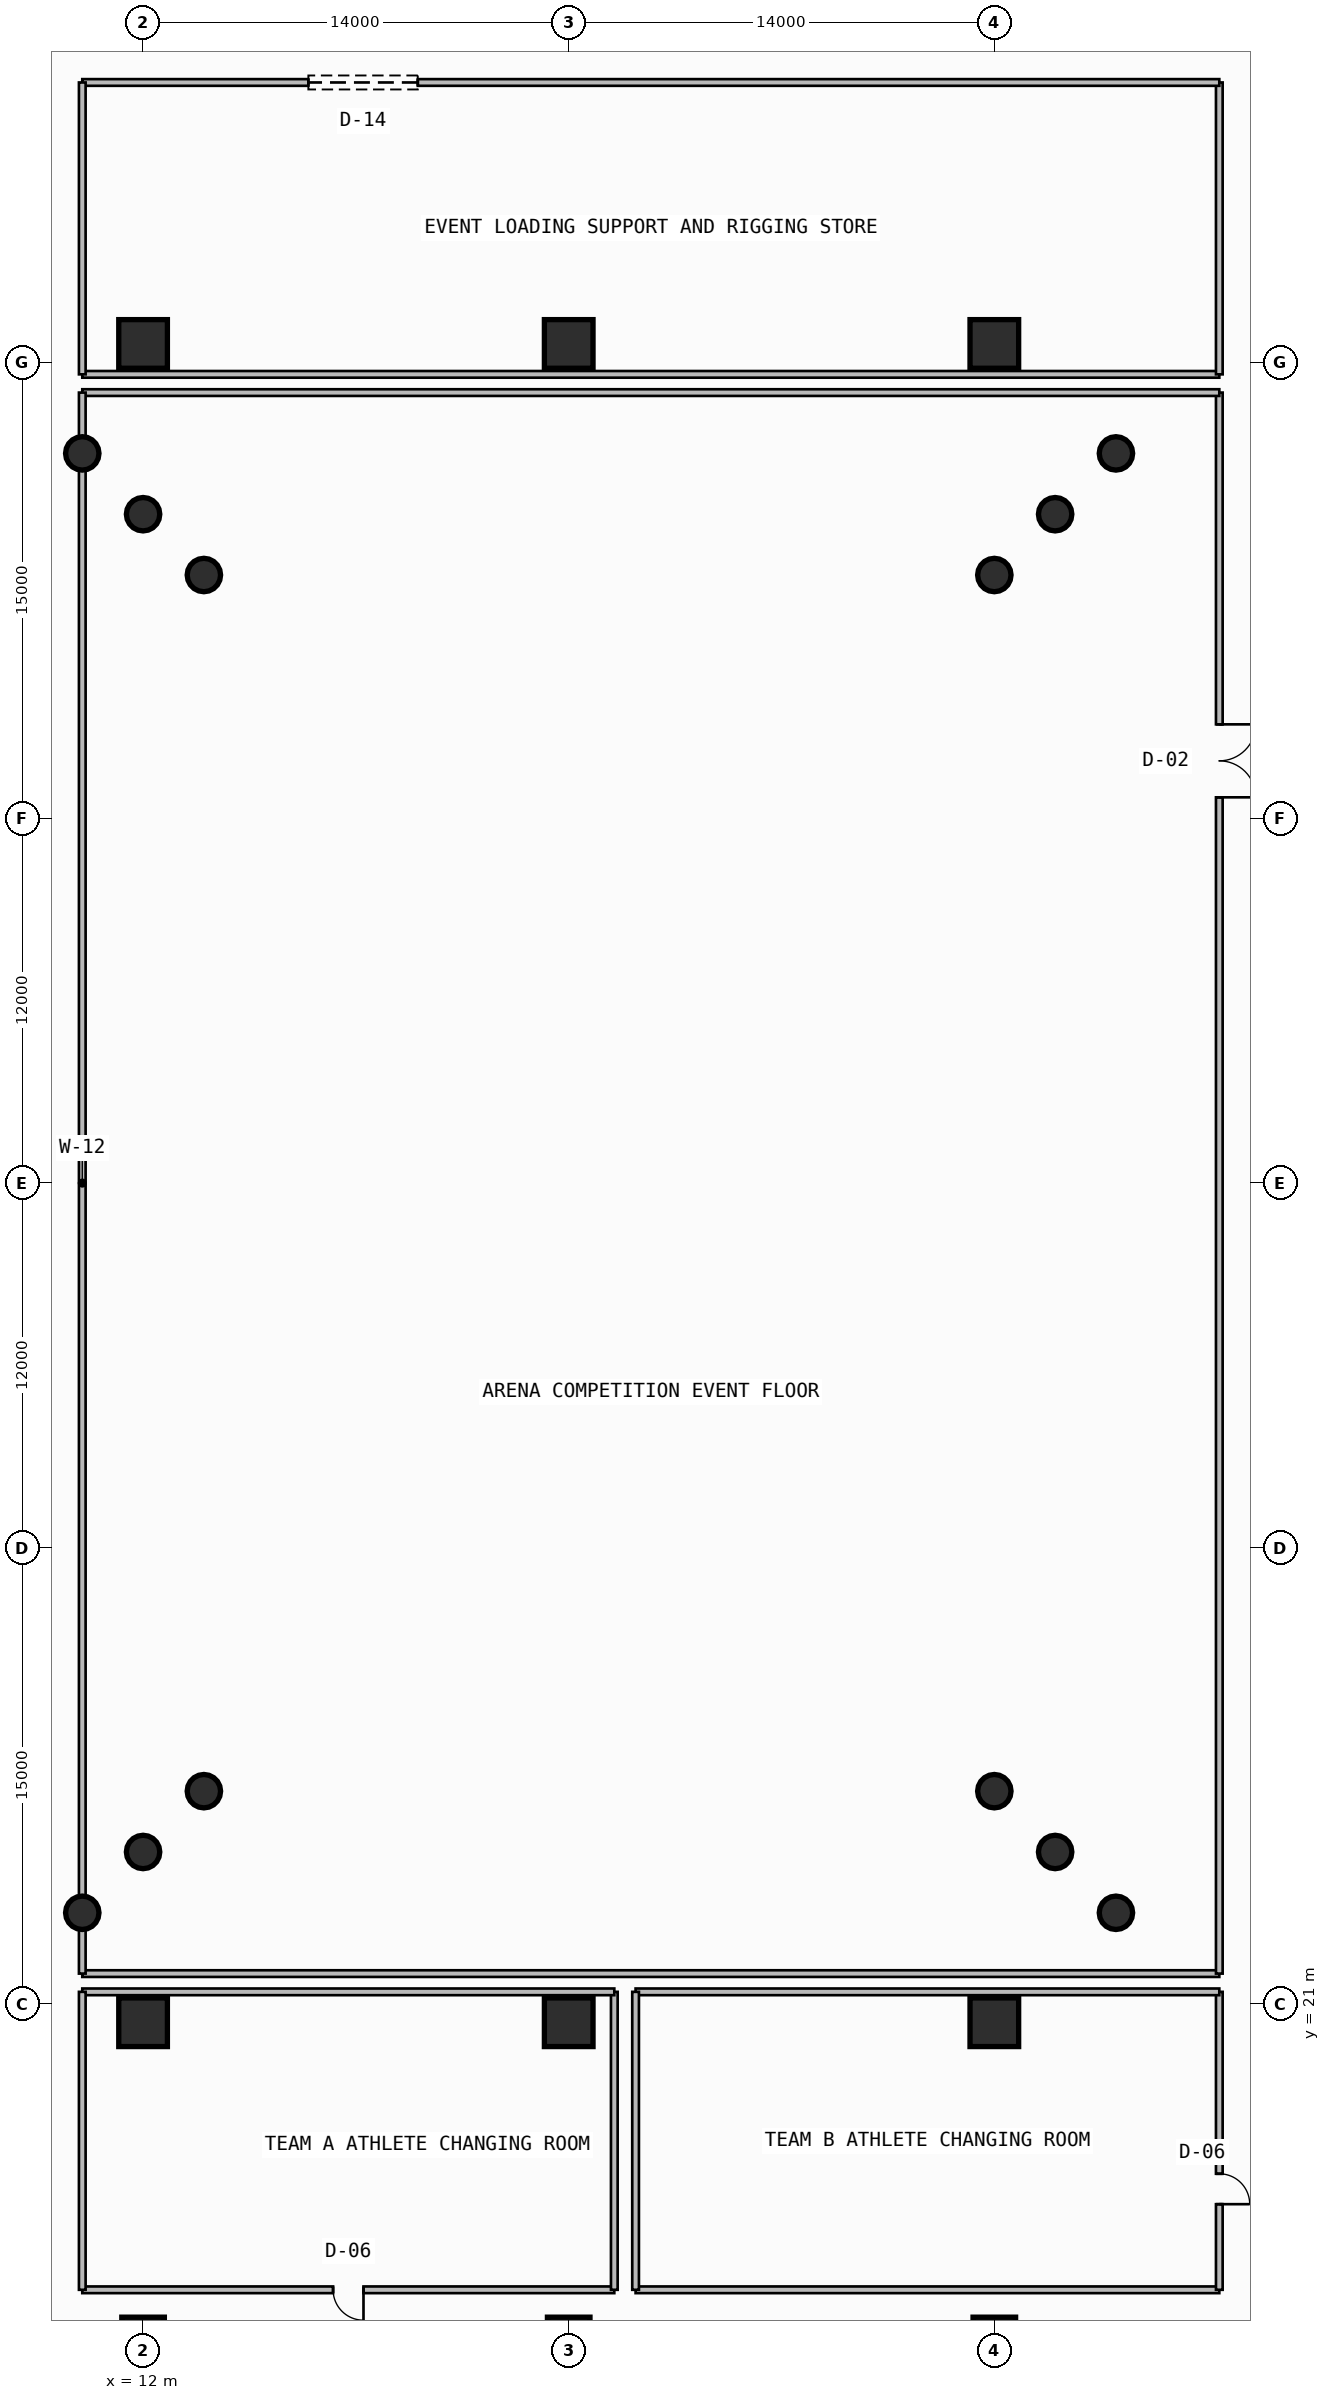
"""IFC4 building model, lengths in metres.
Left out: names, types, materials, properties, quantities, classifications, styles, units other than length and angle.
Written with IfcOpenShell. Run it as: python <this file> out.ifc"""

import sys

from ifc_helpers import new_model, si_unit, direction, frame, frame_2d, origin, origin_2d, place, context, subcontext, project, spatial, rectangle, circle, extrude, element, fill, save


model = new_model("IFC4")
c1 = context("Model", 3, precision=1e-05, world=origin(), true_north=direction((0.0, 1.0)))
c2 = subcontext(c1, "Body", "Model", "MODEL_VIEW")
j1 = project(units=[si_unit("LENGTHUNIT", "METRE"), si_unit("PLANEANGLEUNIT", "RADIAN")], contexts=[c1])
p1 = place(None, origin())
s1 = spatial("IfcSite", under=j1, at=p1, CompositionType="ELEMENT")
p2 = place(p1, origin())
s2 = spatial("IfcBuilding", under=s1, at=p2, CompositionType="ELEMENT")
p3 = place(p2, frame((0.0, 0.0, -6.0)))
s3 = spatial("IfcBuildingStorey", under=s2, at=p3, CompositionType="ELEMENT", Elevation=-6.0)
p4 = place(p3, frame((12.0, 10.0, -0.6), z_axis=(0.0, 0.0, 1.0), x_axis=(1.0, 0.0, 0.0)))
e1 = element("IfcColumn", 1, at=p4, inside=s3, PredefinedType="COLUMN", context=c2, shape_type="SweptSolid", body=[
    extrude(rectangle(XDim=1.4, YDim=1.4, at=origin_2d()), origin(), (0.0, 0.0, 1.0), 6.6),
])
for number, where, z_axis, x_axis in (
    (2, (12.0, 20.4, -0.6), (0.0, 0.0, 1.0), (1.0, 0.0, 0.0)),
    (3, (12.0, 75.6, -0.6), (0.0, 0.0, 1.0), (1.0, 0.0, 0.0)),
):
    element("IfcColumn", number, at=place(p3, frame(where, z_axis=z_axis, x_axis=x_axis)), inside=s3, PredefinedType="COLUMN", context=c2, shape_type="SweptSolid", body=[
        extrude(rectangle(XDim=1.6, YDim=1.6, at=origin_2d()), origin(), (0.0, 0.0, 1.0), 6.6),
    ])
p5 = place(p3, frame((26.0, 10.0, -0.6), z_axis=(0.0, 0.0, 1.0), x_axis=(1.0, 0.0, 0.0)))
e4 = element("IfcColumn", 4, at=p5, inside=s3, PredefinedType="COLUMN", context=c2, shape_type="SweptSolid", body=[
    extrude(rectangle(XDim=1.4, YDim=1.4, at=origin_2d()), origin(), (0.0, 0.0, 1.0), 6.6),
])
for number, where, z_axis, x_axis in (
    (5, (26.0, 20.4, -0.6), (0.0, 0.0, 1.0), (1.0, 0.0, 0.0)),
    (6, (26.0, 75.6, -0.6), (0.0, 0.0, 1.0), (1.0, 0.0, 0.0)),
):
    element("IfcColumn", number, at=place(p3, frame(where, z_axis=z_axis, x_axis=x_axis)), inside=s3, PredefinedType="COLUMN", context=c2, shape_type="SweptSolid", body=[
        extrude(rectangle(XDim=1.6, YDim=1.6, at=origin_2d()), origin(), (0.0, 0.0, 1.0), 6.6),
    ])
p6 = place(p3, frame((40.0, 10.0, -0.6), z_axis=(0.0, 0.0, 1.0), x_axis=(1.0, 0.0, 0.0)))
e7 = element("IfcColumn", 7, at=p6, inside=s3, PredefinedType="COLUMN", context=c2, shape_type="SweptSolid", body=[
    extrude(rectangle(XDim=1.4, YDim=1.4, at=origin_2d()), origin(), (0.0, 0.0, 1.0), 6.6),
])
for number, where, z_axis, x_axis in (
    (8, (40.0, 20.4, -0.6), (0.0, 0.0, 1.0), (1.0, 0.0, 0.0)),
    (9, (40.0, 75.6, -0.6), (0.0, 0.0, 1.0), (1.0, 0.0, 0.0)),
):
    element("IfcColumn", number, at=place(p3, frame(where, z_axis=z_axis, x_axis=x_axis)), inside=s3, PredefinedType="COLUMN", context=c2, shape_type="SweptSolid", body=[
        extrude(rectangle(XDim=1.6, YDim=1.6, at=origin_2d()), origin(), (0.0, 0.0, 1.0), 6.6),
    ])
for number, where, z_axis, x_axis in (
    (10, (14.0, 28.0, -0.6), (0.0, 0.0, 1.0), (1.0, 0.0, 0.0)),
    (11, (40.0, 28.0, -0.6), (0.0, 0.0, 1.0), (1.0, 0.0, 0.0)),
    (12, (40.0, 68.0, -0.6), (0.0, 0.0, 1.0), (1.0, 0.0, 0.0)),
    (13, (14.0, 68.0, -0.6), (0.0, 0.0, 1.0), (1.0, 0.0, 0.0)),
    (14, (12.0, 26.0, -0.6), (0.0, 0.0, 1.0), (1.0, 0.0, 0.0)),
    (15, (42.0, 26.0, -0.6), (0.0, 0.0, 1.0), (1.0, 0.0, 0.0)),
    (16, (42.0, 70.0, -0.6), (0.0, 0.0, 1.0), (1.0, 0.0, 0.0)),
    (17, (12.0, 70.0, -0.6), (0.0, 0.0, 1.0), (1.0, 0.0, 0.0)),
    (18, (10.0, 24.0, -0.6), (0.0, 0.0, 1.0), (1.0, 0.0, 0.0)),
    (19, (44.0, 24.0, -0.6), (0.0, 0.0, 1.0), (1.0, 0.0, 0.0)),
    (20, (44.0, 72.0, -0.6), (0.0, 0.0, 1.0), (1.0, 0.0, 0.0)),
    (21, (10.0, 72.0, -0.6), (0.0, 0.0, 1.0), (1.0, 0.0, 0.0)),
):
    element("IfcColumn", number, at=place(p3, frame(where, z_axis=z_axis, x_axis=x_axis)), inside=s3, PredefinedType="PILASTER", context=c2, shape_type="SweptSolid", body=[
        extrude(circle(Radius=0.55, at=origin_2d()), origin(), (0.0, 0.0, 1.0), 6.6),
    ])
p7 = place(p3, frame((10.0, 22.0, 0.0), z_axis=(0.0, 0.0, 1.0), x_axis=(1.0, 0.0, 0.0)))
e22 = element("IfcWall", 22, at=p7, inside=s3, PredefinedType="SOLIDWALL", context=c2, shape_type="SweptSolid", body=[
    extrude(rectangle(XDim=37.4, YDim=0.22, at=frame_2d((18.7, 0.0))), origin(), (0.0, 0.0, 1.0), 5.6),
])
p8 = place(p3, frame((47.4, 22.0, 0.0), z_axis=(0.0, 0.0, 1.0), x_axis=(0.0, 1.0, 0.0)))
e23 = element("IfcWall", 23, at=p8, inside=s3, PredefinedType="SOLIDWALL", context=c2, shape_type="SweptSolid", body=[
    extrude(rectangle(XDim=52.0, YDim=0.22, at=frame_2d((26.0, 0.0))), origin(), (0.0, 0.0, 1.0), 5.6),
])
p9 = place(p8, frame((38.688, 0.0, 0.0)))
e24 = element("IfcOpeningElement", 24, at=p9, cuts=e23, PredefinedType="OPENING", context=c2, shape_type="SweptSolid", body=[
    extrude(rectangle(XDim=2.4, YDim=2.4, at=frame_2d((1.2, 1.2))), frame((0.0, 0.12, 0.0), z_axis=(0.0, -1.0, 0.0), x_axis=(1.0, 0.0, 0.0)), (0.0, 0.0, 1.0), 0.24),
])
p10 = place(p3, frame((47.4, 74.0, 0.0), z_axis=(0.0, 0.0, 1.0), x_axis=(-1.0, 0.0, 0.0)))
e25 = element("IfcWall", 25, at=p10, inside=s3, PredefinedType="SOLIDWALL", context=c2, shape_type="SweptSolid", body=[
    extrude(rectangle(XDim=37.4, YDim=0.22, at=frame_2d((18.7, 0.0))), origin(), (0.0, 0.0, 1.0), 5.6),
])
p11 = place(p3, frame((10.0, 74.0, 0.0), z_axis=(0.0, 0.0, 1.0), x_axis=(0.0, -1.0, 0.0)))
e26 = element("IfcWall", 26, at=p11, inside=s3, PredefinedType="SOLIDWALL", context=c2, shape_type="SweptSolid", body=[
    extrude(rectangle(XDim=52.0, YDim=0.22, at=frame_2d((26.0, 0.0))), origin(), (0.0, 0.0, 1.0), 5.6),
])
p12 = place(p3, frame((10.0, 11.6, 0.0), z_axis=(0.0, 0.0, 1.0), x_axis=(1.0, 0.0, 0.0)))
e27 = element("IfcWall", 27, at=p12, inside=s3, PredefinedType="SOLIDWALL", context=c2, shape_type="SweptSolid", body=[
    extrude(rectangle(XDim=17.5, YDim=0.22, at=frame_2d((8.75, 0.0))), origin(), (0.0, 0.0, 1.0), 4.885),
])
p13 = place(p12, frame((8.25, 0.0, 0.0)))
e28 = element("IfcOpeningElement", 28, at=p13, cuts=e27, PredefinedType="OPENING", context=c2, shape_type="SweptSolid", body=[
    extrude(rectangle(XDim=1.0, YDim=2.2, at=frame_2d((0.5, 1.1))), frame((0.0, 0.12, 0.0), z_axis=(0.0, -1.0, 0.0), x_axis=(1.0, 0.0, 0.0)), (0.0, 0.0, 1.0), 0.24),
])
p14 = place(p3, frame((27.5, 11.6, 0.0), z_axis=(0.0, 0.0, 1.0), x_axis=(0.0, 1.0, 0.0)))
e29 = element("IfcWall", 29, at=p14, inside=s3, PredefinedType="SOLIDWALL", context=c2, shape_type="SweptSolid", body=[
    extrude(rectangle(XDim=9.8, YDim=0.22, at=frame_2d((4.9, 0.0))), origin(), (0.0, 0.0, 1.0), 4.885),
])
p15 = place(p3, frame((27.5, 21.4, 0.0), z_axis=(0.0, 0.0, 1.0), x_axis=(-1.0, 0.0, 0.0)))
e30 = element("IfcWall", 30, at=p15, inside=s3, PredefinedType="SOLIDWALL", context=c2, shape_type="SweptSolid", body=[
    extrude(rectangle(XDim=17.5, YDim=0.22, at=frame_2d((8.75, 0.0))), origin(), (0.0, 0.0, 1.0), 5.6),
])
p16 = place(p3, frame((10.0, 21.4, 0.0), z_axis=(0.0, 0.0, 1.0), x_axis=(0.0, -1.0, 0.0)))
e31 = element("IfcWall", 31, at=p16, inside=s3, PredefinedType="SOLIDWALL", context=c2, shape_type="SweptSolid", body=[
    extrude(rectangle(XDim=9.8, YDim=0.22, at=frame_2d((4.9, 0.0))), origin(), (0.0, 0.0, 1.0), 4.885),
])
p17 = place(p3, frame((28.2, 11.6, 0.0), z_axis=(0.0, 0.0, 1.0), x_axis=(1.0, 0.0, 0.0)))
e32 = element("IfcWall", 32, at=p17, inside=s3, PredefinedType="SOLIDWALL", context=c2, shape_type="SweptSolid", body=[
    extrude(rectangle(XDim=19.2, YDim=0.22, at=frame_2d((9.6, 0.0))), origin(), (0.0, 0.0, 1.0), 4.885),
])
p18 = place(p3, frame((47.4, 11.6, 0.0), z_axis=(0.0, 0.0, 1.0), x_axis=(0.0, 1.0, 0.0)))
e33 = element("IfcWall", 33, at=p18, inside=s3, PredefinedType="SOLIDWALL", context=c2, shape_type="SweptSolid", body=[
    extrude(rectangle(XDim=9.8, YDim=0.22, at=frame_2d((4.9, 0.0))), origin(), (0.0, 0.0, 1.0), 4.885),
])
p19 = place(p18, frame((2.816, 0.0, 0.0)))
e34 = element("IfcOpeningElement", 34, at=p19, cuts=e33, PredefinedType="OPENING", context=c2, shape_type="SweptSolid", body=[
    extrude(rectangle(XDim=1.0, YDim=2.2, at=frame_2d((0.5, 1.1))), frame((0.0, 0.12, 0.0), z_axis=(0.0, -1.0, 0.0), x_axis=(1.0, 0.0, 0.0)), (0.0, 0.0, 1.0), 0.24),
])
p20 = place(p3, frame((47.4, 21.4, 0.0), z_axis=(0.0, 0.0, 1.0), x_axis=(-1.0, 0.0, 0.0)))
e35 = element("IfcWall", 35, at=p20, inside=s3, PredefinedType="SOLIDWALL", context=c2, shape_type="SweptSolid", body=[
    extrude(rectangle(XDim=19.2, YDim=0.22, at=frame_2d((9.6, 0.0))), origin(), (0.0, 0.0, 1.0), 5.6),
])
p21 = place(p3, frame((28.2, 21.4, 0.0), z_axis=(0.0, 0.0, 1.0), x_axis=(0.0, -1.0, 0.0)))
e36 = element("IfcWall", 36, at=p21, inside=s3, PredefinedType="SOLIDWALL", context=c2, shape_type="SweptSolid", body=[
    extrude(rectangle(XDim=9.8, YDim=0.22, at=frame_2d((4.9, 0.0))), origin(), (0.0, 0.0, 1.0), 4.885),
])
p22 = place(p3, frame((10.0, 74.6, 0.0), z_axis=(0.0, 0.0, 1.0), x_axis=(1.0, 0.0, 0.0)))
e37 = element("IfcWall", 37, at=p22, inside=s3, PredefinedType="SOLIDWALL", context=c2, shape_type="SweptSolid", body=[
    extrude(rectangle(XDim=37.4, YDim=0.22, at=frame_2d((18.7, 0.0))), origin(), (0.0, 0.0, 1.0), 5.6),
])
p23 = place(p3, frame((47.4, 74.6, 0.0), z_axis=(0.0, 0.0, 1.0), x_axis=(0.0, 1.0, 0.0)))
e38 = element("IfcWall", 38, at=p23, inside=s3, PredefinedType="SOLIDWALL", context=c2, shape_type="SweptSolid", body=[
    extrude(rectangle(XDim=9.6, YDim=0.22, at=frame_2d((4.8, 0.0))), origin(), (0.0, 0.0, 1.0), 4.885),
])
p24 = place(p3, frame((47.4, 84.2, 0.0), z_axis=(0.0, 0.0, 1.0), x_axis=(-1.0, 0.0, 0.0)))
e39 = element("IfcWall", 39, at=p24, inside=s3, PredefinedType="SOLIDWALL", context=c2, shape_type="SweptSolid", body=[
    extrude(rectangle(XDim=37.4, YDim=0.22, at=frame_2d((18.7, 0.0))), origin(), (0.0, 0.0, 1.0), 4.885),
])
p25 = place(p24, frame((26.364, 0.0, 0.0)))
e40 = element("IfcOpeningElement", 40, at=p25, cuts=e39, PredefinedType="OPENING", context=c2, shape_type="SweptSolid", body=[
    extrude(rectangle(XDim=3.6, YDim=3.8, at=frame_2d((1.8, 1.9))), frame((0.0, 0.12, 0.0), z_axis=(0.0, -1.0, 0.0), x_axis=(1.0, 0.0, 0.0)), (0.0, 0.0, 1.0), 0.24),
])
p26 = place(p3, frame((10.0, 84.2, 0.0), z_axis=(0.0, 0.0, 1.0), x_axis=(0.0, -1.0, 0.0)))
e41 = element("IfcWall", 41, at=p26, inside=s3, PredefinedType="SOLIDWALL", context=c2, shape_type="SweptSolid", body=[
    extrude(rectangle(XDim=9.6, YDim=0.22, at=frame_2d((4.8, 0.0))), origin(), (0.0, 0.0, 1.0), 4.885),
])
p27 = place(p9, frame((2.4, 0.0, 0.0), z_axis=(0.0, 0.0, 1.0), x_axis=(-1.0, 0.0, 0.0)))
e42 = element("IfcDoor", 42, at=p27, inside=s3, OperationType="DOUBLE_DOOR_SINGLE_SWING", PredefinedType="USERDEFINED", context=c2, shape_type="SweptSolid", body=[
    extrude(rectangle(XDim=2.4, YDim=2.4, at=frame_2d((1.2, 1.2))), frame((0.0, 0.025, 0.0), z_axis=(0.0, -1.0, 0.0), x_axis=(1.0, 0.0, 0.0)), (0.0, 0.0, 1.0), 0.05),
])
fill(e24, e42)
p28 = place(p13, frame((1.0, 0.0, 0.0), z_axis=(0.0, 0.0, 1.0), x_axis=(-1.0, 0.0, 0.0)))
e43 = element("IfcDoor", 43, at=p28, inside=s3, OperationType="SINGLE_SWING_LEFT", PredefinedType="DOOR", context=c2, shape_type="SweptSolid", body=[
    extrude(rectangle(XDim=1.0, YDim=2.2, at=frame_2d((0.5, 1.1))), frame((0.0, 0.025, 0.0), z_axis=(0.0, -1.0, 0.0), x_axis=(1.0, 0.0, 0.0)), (0.0, 0.0, 1.0), 0.05),
])
fill(e28, e43)
p29 = place(p19, frame((1.0, 0.0, 0.0), z_axis=(0.0, 0.0, 1.0), x_axis=(-1.0, 0.0, 0.0)))
e44 = element("IfcDoor", 44, at=p29, inside=s3, OperationType="SINGLE_SWING_RIGHT", PredefinedType="DOOR", context=c2, shape_type="SweptSolid", body=[
    extrude(rectangle(XDim=1.0, YDim=2.2, at=frame_2d((0.5, 1.1))), frame((0.0, 0.025, 0.0), z_axis=(0.0, -1.0, 0.0), x_axis=(1.0, 0.0, 0.0)), (0.0, 0.0, 1.0), 0.05),
])
fill(e34, e44)
p30 = place(p25, frame((3.6, 0.0, 0.0), z_axis=(0.0, 0.0, 1.0), x_axis=(-1.0, 0.0, 0.0)))
e45 = element("IfcDoor", 45, at=p30, inside=s3, OperationType="ROLLINGUP", PredefinedType="GATE", context=c2, shape_type="SweptSolid", body=[
    extrude(rectangle(XDim=3.6, YDim=3.8, at=frame_2d((1.8, 1.9))), frame((0.0, 0.025, 0.0), z_axis=(0.0, -1.0, 0.0), x_axis=(1.0, 0.0, 0.0)), (0.0, 0.0, 1.0), 0.05),
])
fill(e40, e45)
save(model, sys.argv[1])
